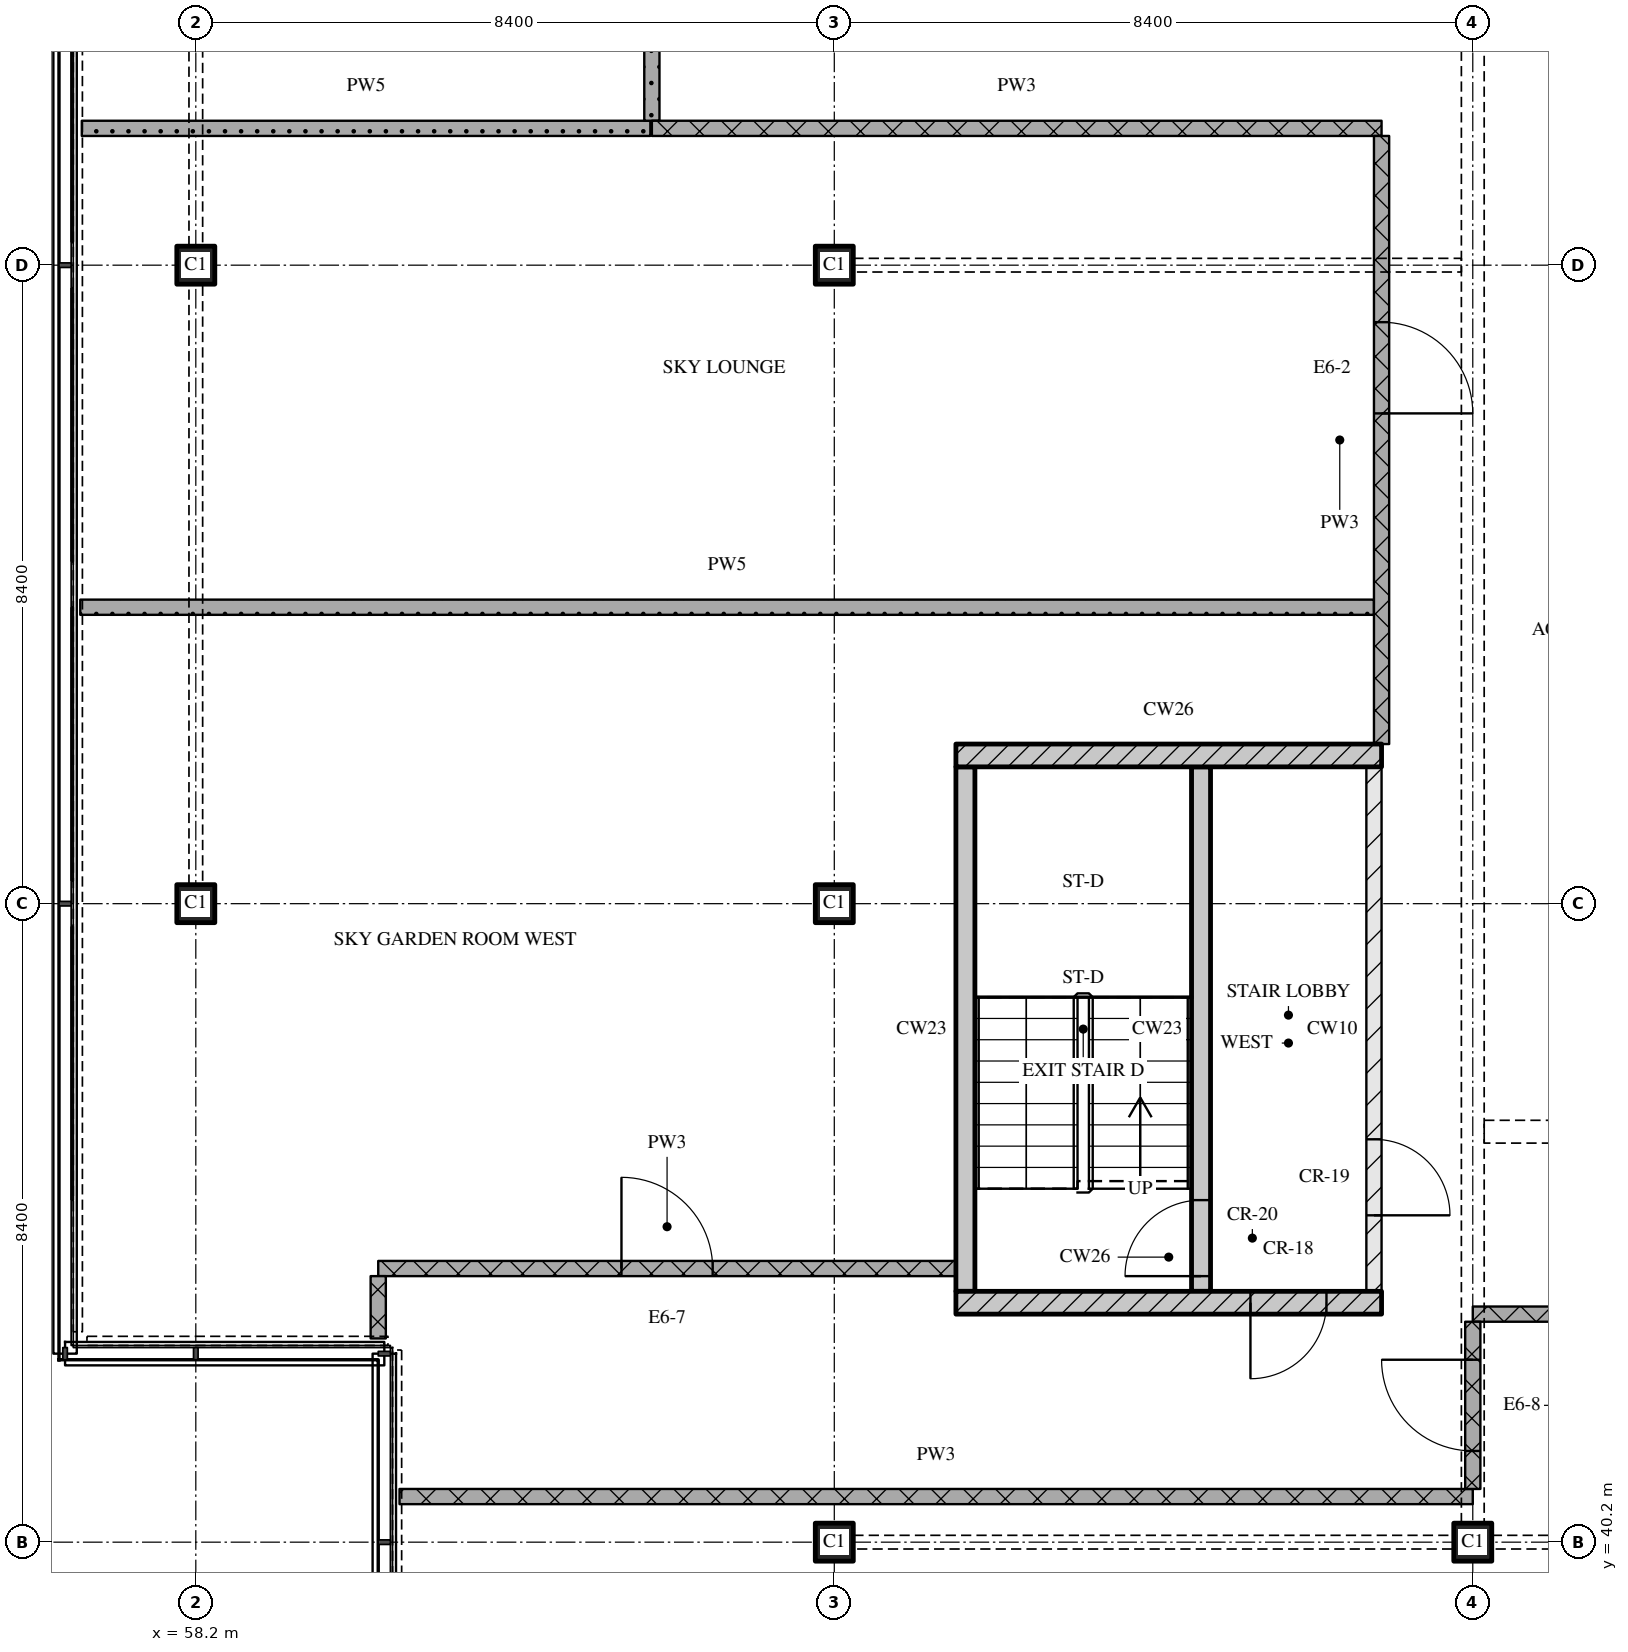
"""IFC4 building model, lengths in metres.
Left out: names, types, materials, properties, quantities, classifications, styles, units other than length and angle.
Written with IfcOpenShell. Run it as: python <this file> out.ifc"""

import sys

from ifc_helpers import new_model, si_unit, direction, frame, frame_2d, origin, origin_2d, place, context, subcontext, project, spatial, rectangle, extrude, element, fill, save


model = new_model("IFC4")
c1 = context("Model", 3, precision=1e-05, world=origin(), true_north=direction((0.0, 1.0)))
c2 = subcontext(c1, "Body", "Model", "MODEL_VIEW")
j1 = project(units=[si_unit("LENGTHUNIT", "METRE"), si_unit("PLANEANGLEUNIT", "RADIAN")], contexts=[c1])
p1 = place(None, origin())
s1 = spatial("IfcSite", under=j1, at=p1, CompositionType="ELEMENT")
p2 = place(p1, origin())
s2 = spatial("IfcBuilding", under=s1, at=p2, CompositionType="ELEMENT")
p3 = place(p2, frame((0.0, 0.0, 299.55)))
s3 = spatial("IfcBuildingStorey", under=s2, at=p3, CompositionType="ELEMENT", Elevation=299.55)
for number, where, z_axis, x_axis in (
    (1, (58.2, 48.6, 0.0), (0.0, 0.0, 1.0), (1.0, 0.0, 0.0)),
    (2, (58.2, 57.0, 0.0), (0.0, 0.0, 1.0), (1.0, 0.0, 0.0)),
    (3, (66.6, 40.2, 0.0), (0.0, 0.0, 1.0), (1.0, 0.0, 0.0)),
    (4, (66.6, 48.6, 0.0), (0.0, 0.0, 1.0), (1.0, 0.0, 0.0)),
    (5, (66.6, 57.0, 0.0), (0.0, 0.0, 1.0), (1.0, 0.0, 0.0)),
    (6, (75.0, 40.2, 0.0), (0.0, 0.0, 1.0), (1.0, 0.0, 0.0)),
):
    element("IfcColumn", number, at=place(p3, frame(where, z_axis=z_axis, x_axis=x_axis)), inside=s3, PredefinedType="COLUMN", context=c2, shape_type="SweptSolid", body=[
        extrude(rectangle(XDim=0.5, YDim=0.5, at=origin_2d()), origin(), (0.0, 0.0, 1.0), 3.6),
    ])
p4 = place(p3, frame((68.2, 43.35, 0.0), z_axis=(0.0, 0.0, 1.0), x_axis=(1.0, 0.0, 0.0)))
e7 = element("IfcWall", 7, at=p4, inside=s3, PredefinedType="SOLIDWALL", context=c2, shape_type="SweptSolid", body=[
    extrude(rectangle(XDim=5.6, YDim=0.3, at=frame_2d((2.8, 0.0))), origin(), (0.0, 0.0, 1.0), 3.32),
])
p5 = place(p4, frame((3.875, 0.0, 0.0)))
e8 = element("IfcOpeningElement", 8, at=p5, cuts=e7, PredefinedType="OPENING", context=c2, shape_type="SweptSolid", body=[
    extrude(rectangle(XDim=1.0, YDim=2.1, at=frame_2d((0.5, 1.05))), frame((0.0, 0.16, 0.0), z_axis=(0.0, -1.0, 0.0), x_axis=(1.0, 0.0, 0.0)), (0.0, 0.0, 1.0), 0.32),
])
p6 = place(p3, frame((68.325, 43.5, 0.0), z_axis=(0.0, 0.0, 1.0), x_axis=(0.0, 1.0, 0.0)))
e9 = element("IfcWall", 9, at=p6, inside=s3, PredefinedType="SOLIDWALL", context=c2, shape_type="SweptSolid", body=[
    extrude(rectangle(XDim=6.9, YDim=0.25, at=frame_2d((3.45, 0.0))), origin(), (0.0, 0.0, 1.0), 3.32),
])
p7 = place(p3, frame((71.425, 43.5, 0.0), z_axis=(0.0, 0.0, 1.0), x_axis=(0.0, 1.0, 0.0)))
e10 = element("IfcWall", 10, at=p7, inside=s3, PredefinedType="SOLIDWALL", context=c2, shape_type="SweptSolid", body=[
    extrude(rectangle(XDim=6.9, YDim=0.25, at=frame_2d((3.45, 0.0))), origin(), (0.0, 0.0, 1.0), 3.32),
])
p8 = place(p7, frame((0.2, 0.0, 0.0)))
e11 = element("IfcOpeningElement", 11, at=p8, cuts=e10, PredefinedType="OPENING", context=c2, shape_type="SweptSolid", body=[
    extrude(rectangle(XDim=1.0, YDim=2.1, at=frame_2d((0.5, 1.05))), frame((0.0, 0.135, 0.0), z_axis=(0.0, -1.0, 0.0), x_axis=(1.0, 0.0, 0.0)), (0.0, 0.0, 1.0), 0.27),
])
p9 = place(p3, frame((73.7, 43.5, 0.0), z_axis=(0.0, 0.0, 1.0), x_axis=(0.0, 1.0, 0.0)))
e12 = element("IfcWall", 12, at=p9, inside=s3, PredefinedType="PARTITIONING", context=c2, shape_type="SweptSolid", body=[
    extrude(rectangle(XDim=6.9, YDim=0.2, at=frame_2d((3.45, 0.0))), origin(), (0.0, 0.0, 1.0), 3.32),
])
p10 = place(p9, frame((1.0, 0.0, 0.0)))
e13 = element("IfcOpeningElement", 13, at=p10, cuts=e12, PredefinedType="OPENING", context=c2, shape_type="SweptSolid", body=[
    extrude(rectangle(XDim=1.0, YDim=2.1, at=frame_2d((0.5, 1.05))), frame((0.0, 0.11, 0.0), z_axis=(0.0, -1.0, 0.0), x_axis=(1.0, 0.0, 0.0)), (0.0, 0.0, 1.0), 0.22),
])
p11 = place(p3, frame((68.2, 50.55, 0.0), z_axis=(0.0, 0.0, 1.0), x_axis=(1.0, 0.0, 0.0)))
e14 = element("IfcWall", 14, at=p11, inside=s3, PredefinedType="SOLIDWALL", context=c2, shape_type="SweptSolid", body=[
    extrude(rectangle(XDim=5.6, YDim=0.3, at=frame_2d((2.8, 0.0))), origin(), (0.0, 0.0, 1.0), 3.32),
])
p12 = place(p3, frame((60.88, 40.8, 0.0), z_axis=(0.0, 0.0, 1.0), x_axis=(1.0, 0.0, 0.0)))
e15 = element("IfcWall", 15, at=p12, inside=s3, PredefinedType="PARTITIONING", context=c2, shape_type="SweptSolid", body=[
    extrude(rectangle(XDim=14.12, YDim=0.2, at=frame_2d((7.06, 0.0))), origin(), (0.0, 0.0, 1.0), 3.32),
])
p13 = place(p3, frame((100.2, 43.2, 0.0), z_axis=(0.0, 0.0, 1.0), x_axis=(-1.0, 0.0, 0.0)))
e16 = element("IfcWall", 16, at=p13, inside=s3, PredefinedType="PARTITIONING", context=c2, shape_type="SweptSolid", body=[
    extrude(rectangle(XDim=25.2, YDim=0.2, at=frame_2d((12.6, 0.0))), origin(), (0.0, 0.0, 1.0), 3.32),
])
p14 = place(p13, frame((12.0, 0.0, 0.0)))
e17 = element("IfcOpeningElement", 17, at=p14, cuts=e16, PredefinedType="OPENING", context=c2, shape_type="SweptSolid", body=[
    extrude(rectangle(XDim=1.2, YDim=2.1, at=frame_2d((0.6, 1.05))), frame((0.0, 0.11, 0.0), z_axis=(0.0, -1.0, 0.0), x_axis=(1.0, 0.0, 0.0)), (0.0, 0.0, 1.0), 0.22),
])
p15 = place(p3, frame((60.6, 43.8, 0.0), z_axis=(0.0, 0.0, 1.0), x_axis=(1.0, 0.0, 0.0)))
e18 = element("IfcWall", 18, at=p15, inside=s3, PredefinedType="PARTITIONING", context=c2, shape_type="SweptSolid", body=[
    extrude(rectangle(XDim=7.6, YDim=0.2, at=frame_2d((3.8, 0.0))), origin(), (0.0, 0.0, 1.0), 3.32),
])
p16 = place(p15, frame((3.2, 0.0, 0.0)))
e19 = element("IfcOpeningElement", 19, at=p16, cuts=e18, PredefinedType="OPENING", context=c2, shape_type="SweptSolid", body=[
    extrude(rectangle(XDim=1.2, YDim=2.1, at=frame_2d((0.6, 1.05))), frame((0.0, 0.11, 0.0), z_axis=(0.0, -1.0, 0.0), x_axis=(1.0, 0.0, 0.0)), (0.0, 0.0, 1.0), 0.22),
])
p17 = place(p3, frame((56.68, 52.5, 0.0), z_axis=(0.0, 0.0, 1.0), x_axis=(1.0, 0.0, 0.0)))
e20 = element("IfcWall", 20, at=p17, inside=s3, PredefinedType="PARTITIONING", context=c2, shape_type="SweptSolid", body=[
    extrude(rectangle(XDim=17.02, YDim=0.2, at=frame_2d((8.51, 0.0))), origin(), (0.0, 0.0, 1.0), 3.32),
])
p18 = place(p3, frame((64.2, 58.8, 0.0), z_axis=(0.0, 0.0, 1.0), x_axis=(1.0, 0.0, 0.0)))
e21 = element("IfcWall", 21, at=p18, inside=s3, PredefinedType="PARTITIONING", context=c2, shape_type="SweptSolid", body=[
    extrude(rectangle(XDim=9.6, YDim=0.2, at=frame_2d((4.8, 0.0))), origin(), (0.0, 0.0, 1.0), 3.32),
])
p19 = place(p3, frame((56.7, 58.8, 0.0), z_axis=(0.0, 0.0, 1.0), x_axis=(1.0, 0.0, 0.0)))
e22 = element("IfcWall", 22, at=p19, inside=s3, PredefinedType="PARTITIONING", context=c2, shape_type="SweptSolid", body=[
    extrude(rectangle(XDim=7.48, YDim=0.2, at=frame_2d((3.74, 0.0))), origin(), (0.0, 0.0, 1.0), 3.32),
])
p20 = place(p3, frame((60.6, 43.7, 0.0), z_axis=(0.0, 0.0, 1.0), x_axis=(0.0, -1.0, 0.0)))
e23 = element("IfcWall", 23, at=p20, inside=s3, PredefinedType="PARTITIONING", context=c2, shape_type="SweptSolid", body=[
    extrude(rectangle(XDim=0.82, YDim=0.2, at=frame_2d((0.41, 0.0))), origin(), (0.0, 0.0, 1.0), 3.32),
])
p21 = place(p3, frame((64.2, 61.1, 0.0), z_axis=(0.0, 0.0, 1.0), x_axis=(0.0, -1.0, 0.0)))
e24 = element("IfcWall", 24, at=p21, inside=s3, PredefinedType="PARTITIONING", context=c2, shape_type="SweptSolid", body=[
    extrude(rectangle(XDim=2.2, YDim=0.2, at=frame_2d((1.1, 0.0))), origin(), (0.0, 0.0, 1.0), 3.32),
])
p22 = place(p3, frame((73.8, 50.7, 0.0), z_axis=(0.0, 0.0, 1.0), x_axis=(0.0, 1.0, 0.0)))
e25 = element("IfcWall", 25, at=p22, inside=s3, PredefinedType="PARTITIONING", context=c2, shape_type="SweptSolid", body=[
    extrude(rectangle(XDim=8.0, YDim=0.2, at=frame_2d((4.0, 0.0))), origin(), (0.0, 0.0, 1.0), 3.32),
])
p23 = place(p22, frame((4.35, 0.0, 0.0)))
e26 = element("IfcOpeningElement", 26, at=p23, cuts=e25, PredefinedType="OPENING", context=c2, shape_type="SweptSolid", body=[
    extrude(rectangle(XDim=1.2, YDim=2.1, at=frame_2d((0.6, 1.05))), frame((0.0, 0.11, 0.0), z_axis=(0.0, -1.0, 0.0), x_axis=(1.0, 0.0, 0.0)), (0.0, 0.0, 1.0), 0.22),
])
p24 = place(p3, frame((75.0, 43.1, 0.0), z_axis=(0.0, 0.0, 1.0), x_axis=(0.0, -1.0, 0.0)))
e27 = element("IfcWall", 27, at=p24, inside=s3, PredefinedType="PARTITIONING", context=c2, shape_type="SweptSolid", body=[
    extrude(rectangle(XDim=2.2, YDim=0.2, at=frame_2d((1.1, 0.0))), origin(), (0.0, 0.0, 1.0), 2.53),
])
p25 = place(p24, frame((0.5, 0.0, 0.0)))
e28 = element("IfcOpeningElement", 28, at=p25, cuts=e27, PredefinedType="OPENING", context=c2, shape_type="SweptSolid", body=[
    extrude(rectangle(XDim=1.2, YDim=2.1, at=frame_2d((0.6, 1.05))), frame((0.0, 0.11, 0.0), z_axis=(0.0, -1.0, 0.0), x_axis=(1.0, 0.0, 0.0)), (0.0, 0.0, 1.0), 0.22),
])
p26 = place(p5, origin())
e29 = element("IfcDoor", 29, at=p26, inside=s3, OperationType="SINGLE_SWING_RIGHT", PredefinedType="DOOR", context=c2, shape_type="SweptSolid", body=[
    extrude(rectangle(XDim=1.0, YDim=2.1, at=frame_2d((0.5, 1.05))), frame((0.0, 0.025, 0.0), z_axis=(0.0, -1.0, 0.0), x_axis=(1.0, 0.0, 0.0)), (0.0, 0.0, 1.0), 0.05),
])
fill(e8, e29)
p27 = place(p8, origin())
e30 = element("IfcDoor", 30, at=p27, inside=s3, OperationType="SINGLE_SWING_LEFT", PredefinedType="DOOR", context=c2, shape_type="SweptSolid", body=[
    extrude(rectangle(XDim=1.0, YDim=2.1, at=frame_2d((0.5, 1.05))), frame((0.0, 0.025, 0.0), z_axis=(0.0, -1.0, 0.0), x_axis=(1.0, 0.0, 0.0)), (0.0, 0.0, 1.0), 0.05),
])
fill(e11, e30)
p28 = place(p10, origin())
e31 = element("IfcDoor", 31, at=p28, inside=s3, OperationType="SINGLE_SWING_RIGHT", PredefinedType="DOOR", context=c2, shape_type="SweptSolid", body=[
    extrude(rectangle(XDim=1.0, YDim=2.1, at=frame_2d((0.5, 1.05))), frame((0.0, 0.025, 0.0), z_axis=(0.0, -1.0, 0.0), x_axis=(1.0, 0.0, 0.0)), (0.0, 0.0, 1.0), 0.05),
])
fill(e13, e31)
p29 = place(p16, origin())
e32 = element("IfcDoor", 32, at=p29, inside=s3, OperationType="SINGLE_SWING_LEFT", PredefinedType="DOOR", context=c2, shape_type="SweptSolid", body=[
    extrude(rectangle(XDim=1.2, YDim=2.1, at=frame_2d((0.6, 1.05))), frame((0.0, 0.025, 0.0), z_axis=(0.0, -1.0, 0.0), x_axis=(1.0, 0.0, 0.0)), (0.0, 0.0, 1.0), 0.05),
])
fill(e19, e32)
p30 = place(p23, origin())
e33 = element("IfcDoor", 33, at=p30, inside=s3, OperationType="SINGLE_SWING_RIGHT", PredefinedType="DOOR", context=c2, shape_type="SweptSolid", body=[
    extrude(rectangle(XDim=1.2, YDim=2.1, at=frame_2d((0.6, 1.05))), frame((0.0, 0.025, 0.0), z_axis=(0.0, -1.0, 0.0), x_axis=(1.0, 0.0, 0.0)), (0.0, 0.0, 1.0), 0.05),
])
fill(e26, e33)
p31 = place(p25, origin())
e34 = element("IfcDoor", 34, at=p31, inside=s3, OperationType="SINGLE_SWING_RIGHT", PredefinedType="DOOR", context=c2, shape_type="SweptSolid", body=[
    extrude(rectangle(XDim=1.2, YDim=2.1, at=frame_2d((0.6, 1.05))), frame((0.0, 0.025, 0.0), z_axis=(0.0, -1.0, 0.0), x_axis=(1.0, 0.0, 0.0)), (0.0, 0.0, 1.0), 0.05),
])
fill(e28, e34)
save(model, sys.argv[1])
